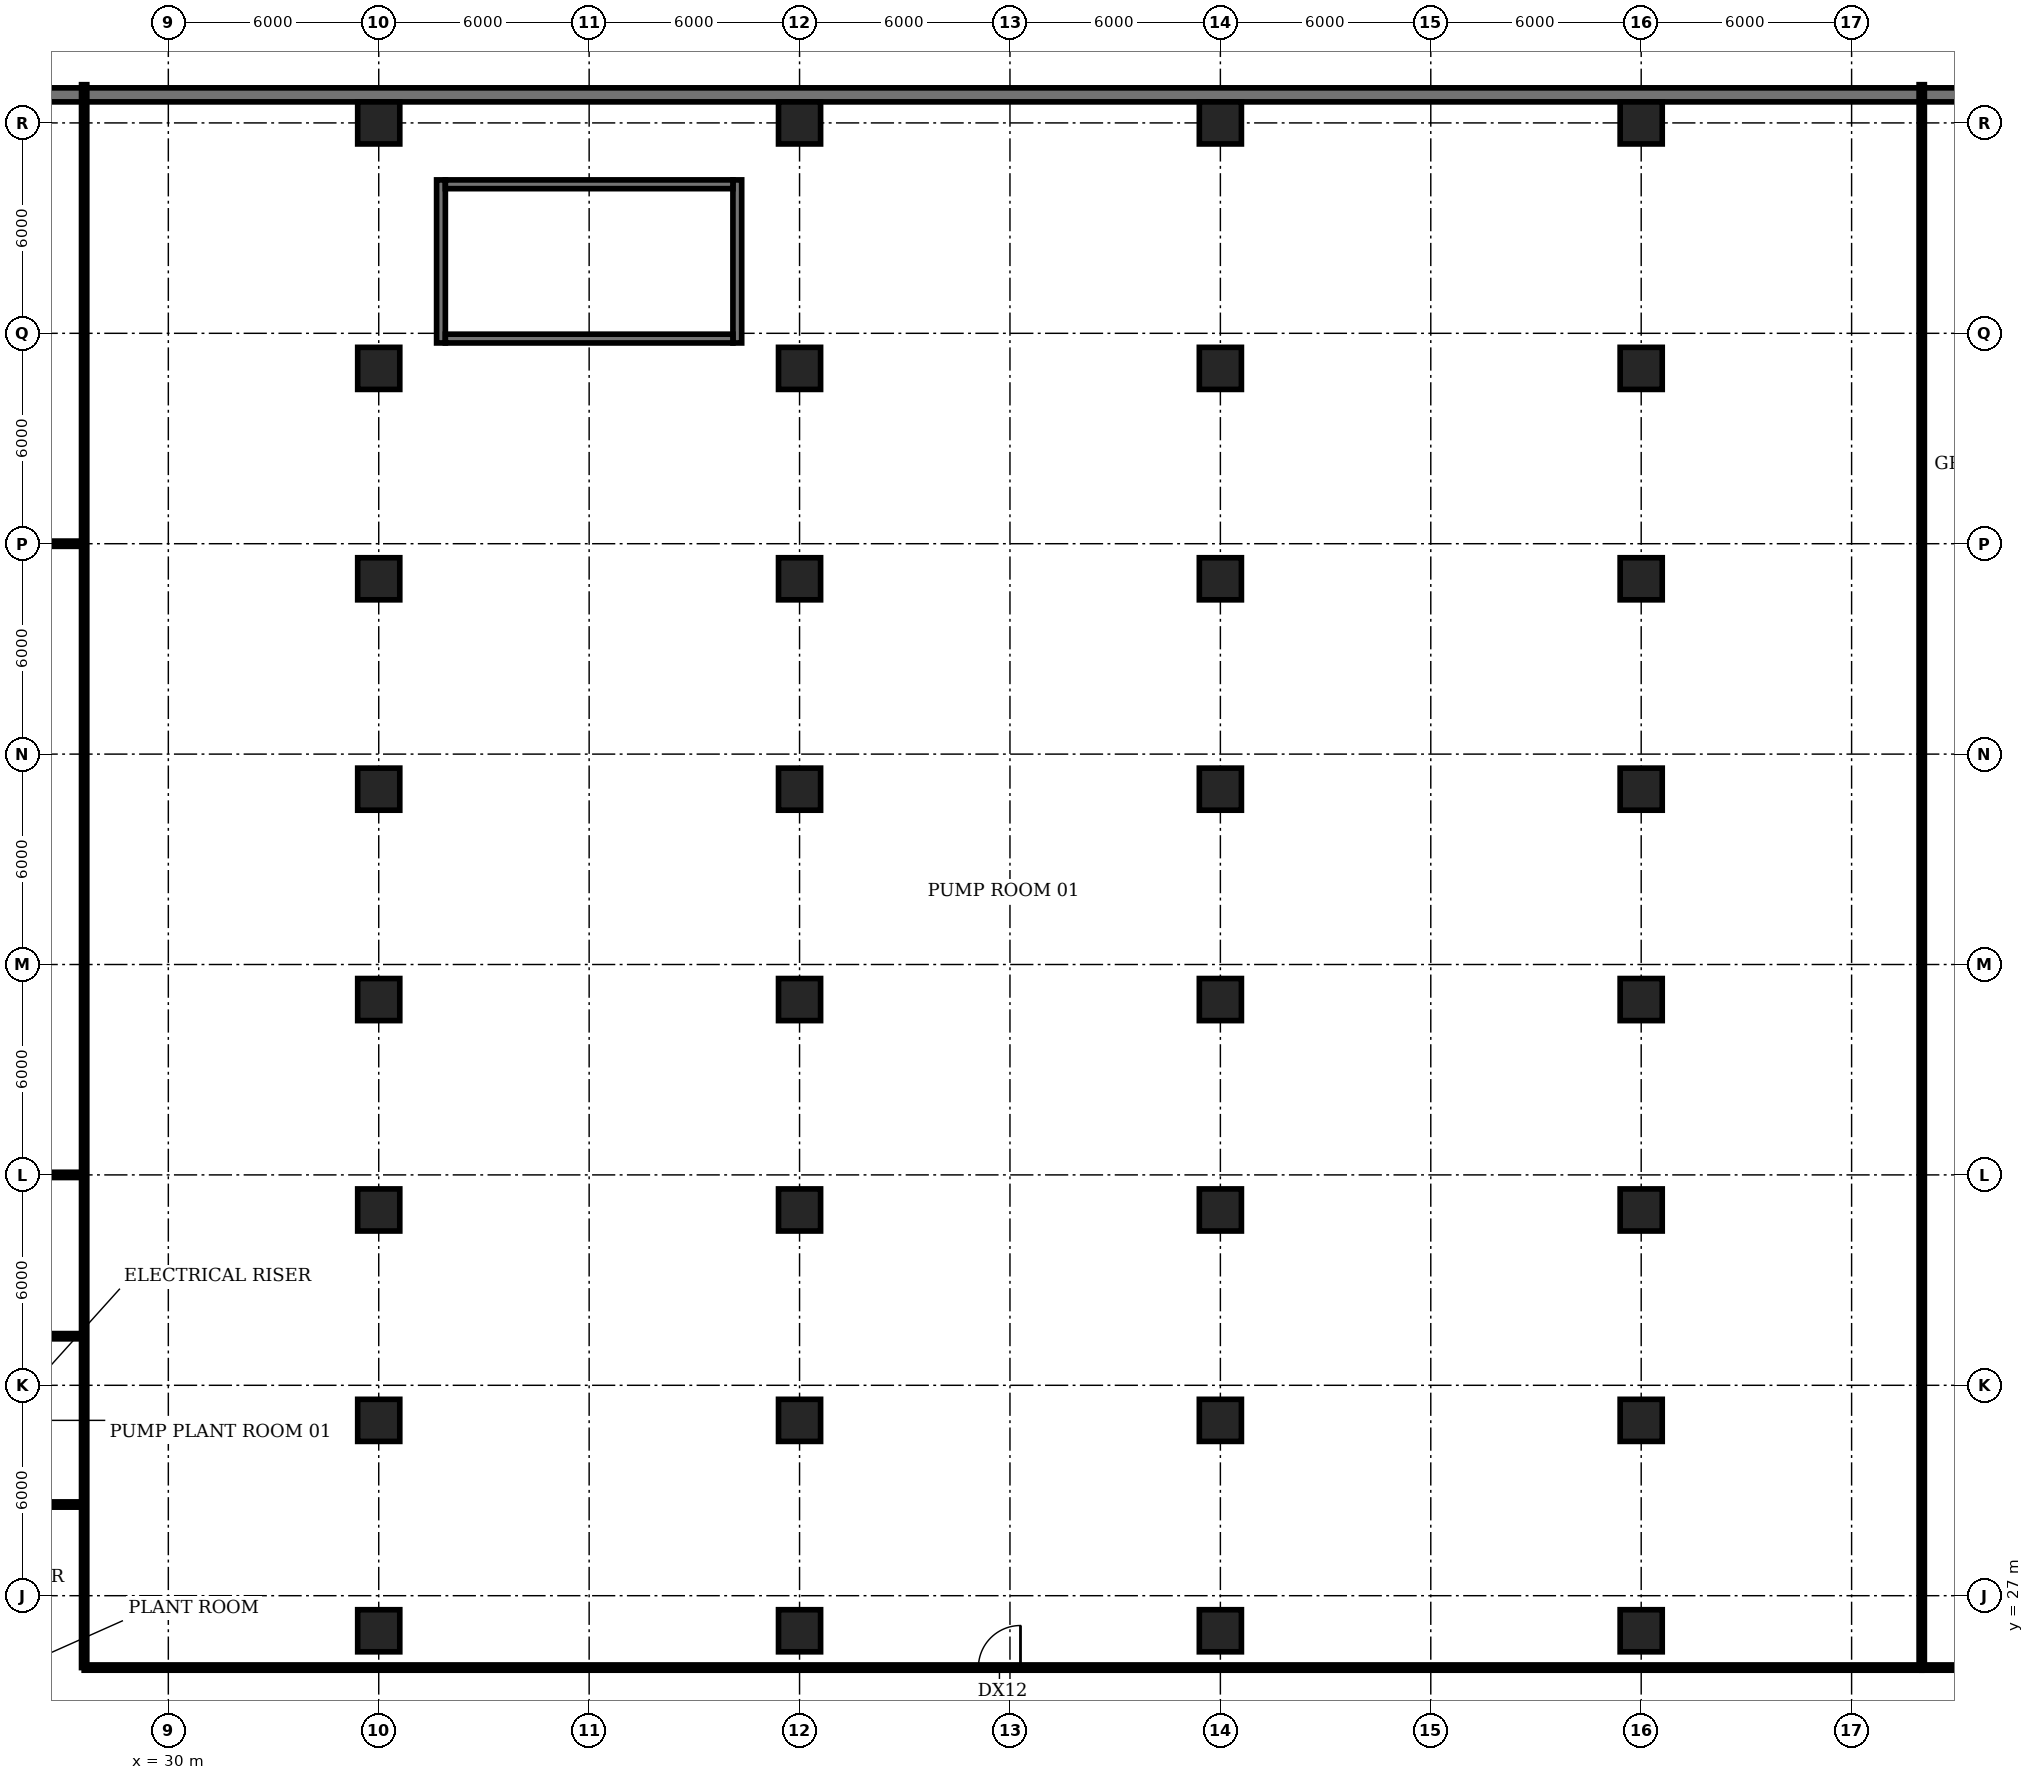
"""IFC4 building model, lengths in metres.
Left out: names, types, materials, properties, quantities, classifications, styles, units other than length and angle.
Written with IfcOpenShell. Run it as: python <this file> out.ifc"""

import sys

from ifc_helpers import new_model, si_unit, direction, frame, frame_2d, origin, origin_2d, place, context, subcontext, project, spatial, rectangle, extrude, element, fill, save


model = new_model("IFC4")
c1 = context("Model", 3, precision=1e-05, world=origin(), true_north=direction((0.0, 1.0)))
c2 = subcontext(c1, "Body", "Model", "MODEL_VIEW")
j1 = project(units=[si_unit("LENGTHUNIT", "METRE"), si_unit("PLANEANGLEUNIT", "RADIAN")], contexts=[c1])
p1 = place(None, origin())
s1 = spatial("IfcSite", under=j1, at=p1, CompositionType="ELEMENT")
p2 = place(p1, origin())
s2 = spatial("IfcBuilding", under=s1, at=p2, CompositionType="ELEMENT")
p3 = place(p2, frame((0.0, 0.0, -6.0)))
s3 = spatial("IfcBuildingStorey", under=s2, at=p3, CompositionType="ELEMENT", Elevation=-6.0)
for number, where, z_axis, x_axis in (
    (1, (36.0, 26.0, -0.3), (0.0, 0.0, 1.0), (1.0, 0.0, 0.0)),
    (2, (36.0, 32.0, -0.3), (0.0, 0.0, 1.0), (1.0, 0.0, 0.0)),
    (3, (36.0, 38.0, -0.3), (0.0, 0.0, 1.0), (1.0, 0.0, 0.0)),
    (4, (36.0, 44.0, -0.3), (0.0, 0.0, 1.0), (1.0, 0.0, 0.0)),
    (5, (36.0, 50.0, -0.3), (0.0, 0.0, 1.0), (1.0, 0.0, 0.0)),
    (6, (36.0, 56.0, -0.3), (0.0, 0.0, 1.0), (1.0, 0.0, 0.0)),
    (7, (36.0, 62.0, -0.3), (0.0, 0.0, 1.0), (1.0, 0.0, 0.0)),
    (8, (36.0, 69.0, -0.3), (0.0, 0.0, 1.0), (1.0, 0.0, 0.0)),
    (9, (48.0, 26.0, -0.3), (0.0, 0.0, 1.0), (1.0, 0.0, 0.0)),
    (10, (48.0, 32.0, -0.3), (0.0, 0.0, 1.0), (1.0, 0.0, 0.0)),
    (11, (48.0, 38.0, -0.3), (0.0, 0.0, 1.0), (1.0, 0.0, 0.0)),
    (12, (48.0, 44.0, -0.3), (0.0, 0.0, 1.0), (1.0, 0.0, 0.0)),
    (13, (48.0, 50.0, -0.3), (0.0, 0.0, 1.0), (1.0, 0.0, 0.0)),
    (14, (48.0, 56.0, -0.3), (0.0, 0.0, 1.0), (1.0, 0.0, 0.0)),
    (15, (48.0, 62.0, -0.3), (0.0, 0.0, 1.0), (1.0, 0.0, 0.0)),
    (16, (48.0, 69.0, -0.3), (0.0, 0.0, 1.0), (1.0, 0.0, 0.0)),
    (17, (60.0, 26.0, -0.3), (0.0, 0.0, 1.0), (1.0, 0.0, 0.0)),
    (18, (60.0, 32.0, -0.3), (0.0, 0.0, 1.0), (1.0, 0.0, 0.0)),
    (19, (60.0, 38.0, -0.3), (0.0, 0.0, 1.0), (1.0, 0.0, 0.0)),
    (20, (60.0, 44.0, -0.3), (0.0, 0.0, 1.0), (1.0, 0.0, 0.0)),
    (21, (60.0, 50.0, -0.3), (0.0, 0.0, 1.0), (1.0, 0.0, 0.0)),
    (22, (60.0, 56.0, -0.3), (0.0, 0.0, 1.0), (1.0, 0.0, 0.0)),
    (23, (60.0, 62.0, -0.3), (0.0, 0.0, 1.0), (1.0, 0.0, 0.0)),
    (24, (60.0, 69.0, -0.3), (0.0, 0.0, 1.0), (1.0, 0.0, 0.0)),
    (25, (72.0, 26.0, -0.3), (0.0, 0.0, 1.0), (1.0, 0.0, 0.0)),
    (26, (72.0, 32.0, -0.3), (0.0, 0.0, 1.0), (1.0, 0.0, 0.0)),
    (27, (72.0, 38.0, -0.3), (0.0, 0.0, 1.0), (1.0, 0.0, 0.0)),
    (28, (72.0, 44.0, -0.3), (0.0, 0.0, 1.0), (1.0, 0.0, 0.0)),
    (29, (72.0, 50.0, -0.3), (0.0, 0.0, 1.0), (1.0, 0.0, 0.0)),
    (30, (72.0, 56.0, -0.3), (0.0, 0.0, 1.0), (1.0, 0.0, 0.0)),
    (31, (72.0, 62.0, -0.3), (0.0, 0.0, 1.0), (1.0, 0.0, 0.0)),
    (32, (72.0, 69.0, -0.3), (0.0, 0.0, 1.0), (1.0, 0.0, 0.0)),
):
    element("IfcColumn", number, at=place(p3, frame(where, z_axis=z_axis, x_axis=x_axis)), inside=s3, PredefinedType="COLUMN", context=c2, shape_type="SweptSolid", body=[
        extrude(rectangle(XDim=1.2, YDim=1.2, at=origin_2d()), origin(), (0.0, 0.0, 1.0), 5.95),
    ])
p4 = place(p3, frame((90.249, 69.8, 0.0), z_axis=(0.0, 0.0, 1.0), x_axis=(-1.0, 0.0, 0.0)))
e33 = element("IfcWall", 33, at=p4, inside=s3, PredefinedType="SOLIDWALL", context=c2, shape_type="SweptSolid", body=[
    extrude(rectangle(XDim=90.497, YDim=0.4, at=frame_2d((45.249, 0.0))), origin(), (0.0, 0.0, 1.0), 5.65),
])
for number, where, z_axis, x_axis in (
    (34, (37.775, 62.725, 0.0), (0.0, 0.0, 1.0), (0.0, 1.0, 0.0)),
    (35, (46.225, 62.725, 0.0), (0.0, 0.0, 1.0), (0.0, 1.0, 0.0)),
):
    element("IfcWall", number, at=place(p3, frame(where, z_axis=z_axis, x_axis=x_axis)), inside=s3, PredefinedType="SHEAR", context=c2, shape_type="SweptSolid", body=[
        extrude(rectangle(XDim=4.65, YDim=0.25, at=frame_2d((2.325, 0.0))), origin(), (0.0, 0.0, 1.0), 5.65),
    ])
for number, where, z_axis, x_axis in (
    (36, (37.9, 62.85, 0.0), (0.0, 0.0, 1.0), (1.0, 0.0, 0.0)),
    (37, (37.9, 67.25, 0.0), (0.0, 0.0, 1.0), (1.0, 0.0, 0.0)),
):
    element("IfcWall", number, at=place(p3, frame(where, z_axis=z_axis, x_axis=x_axis)), inside=s3, PredefinedType="SHEAR", context=c2, shape_type="SweptSolid", body=[
        extrude(rectangle(XDim=8.2, YDim=0.25, at=frame_2d((4.1, 0.0))), origin(), (0.0, 0.0, 1.0), 5.65),
    ])
for number, where, z_axis, x_axis in (
    (38, (10.35, 34.4, 0.0), (0.0, 0.0, 1.0), (1.0, 0.0, 0.0)),
    (39, (10.35, 39.0, 0.0), (0.0, 0.0, 1.0), (1.0, 0.0, 0.0)),
    (40, (10.35, 57.0, 0.0), (0.0, 0.0, 1.0), (1.0, 0.0, 0.0)),
):
    element("IfcWall", number, at=place(p3, frame(where, z_axis=z_axis, x_axis=x_axis)), inside=s3, PredefinedType="PARTITIONING", context=c2, shape_type="SweptSolid", body=[
        extrude(rectangle(XDim=17.25, YDim=0.15, at=frame_2d((8.625, 0.0))), origin(), (0.0, 0.0, 1.0), 4.7),
    ])
p5 = place(p3, frame((24.0, 29.6, 0.0), z_axis=(0.0, 0.0, 1.0), x_axis=(1.0, 0.0, 0.0)))
e41 = element("IfcWall", 41, at=p5, inside=s3, PredefinedType="PARTITIONING", context=c2, shape_type="SweptSolid", body=[
    extrude(rectangle(XDim=3.6, YDim=0.15, at=frame_2d((1.8, 0.0))), origin(), (0.0, 0.0, 1.0), 4.7),
])
p6 = place(p5, frame((1.3, 0.0, 0.0)))
e42 = element("IfcOpeningElement", 42, at=p6, cuts=e41, PredefinedType="OPENING", context=c2, shape_type="SweptSolid", body=[
    extrude(rectangle(XDim=1.2, YDim=2.1, at=frame_2d((0.6, 1.05))), frame((0.0, 0.085, 0.0), z_axis=(0.0, -1.0, 0.0), x_axis=(1.0, 0.0, 0.0)), (0.0, 0.0, 1.0), 0.17),
])
p7 = place(p3, frame((27.6, 24.95, 0.0), z_axis=(0.0, 0.0, 1.0), x_axis=(0.0, 1.0, 0.0)))
e43 = element("IfcWall", 43, at=p7, inside=s3, PredefinedType="PARTITIONING", context=c2, shape_type="SweptSolid", body=[
    extrude(rectangle(XDim=45.14, YDim=0.15, at=frame_2d((22.57, 0.0))), origin(), (0.0, 0.0, 1.0), 4.7),
])
p8 = place(p3, frame((27.6, 24.95, 0.0), z_axis=(0.0, 0.0, 1.0), x_axis=(1.0, 0.0, 0.0)))
e44 = element("IfcWall", 44, at=p8, inside=s3, PredefinedType="PARTITIONING", context=c2, shape_type="SweptSolid", body=[
    extrude(rectangle(XDim=52.4, YDim=0.15, at=frame_2d((26.2, 0.0))), origin(), (0.0, 0.0, 1.0), 4.7),
])
p9 = place(p8, frame((25.5, 0.0, 0.0)))
e45 = element("IfcOpeningElement", 45, at=p9, cuts=e44, PredefinedType="OPENING", context=c2, shape_type="SweptSolid", body=[
    extrude(rectangle(XDim=1.2, YDim=2.1, at=frame_2d((0.6, 1.05))), frame((0.0, 0.085, 0.0), z_axis=(0.0, -1.0, 0.0), x_axis=(1.0, 0.0, 0.0)), (0.0, 0.0, 1.0), 0.17),
])
p10 = place(p3, frame((80.0, 24.95, 0.0), z_axis=(0.0, 0.0, 1.0), x_axis=(0.0, 1.0, 0.0)))
e46 = element("IfcWall", 46, at=p10, inside=s3, PredefinedType="PARTITIONING", context=c2, shape_type="SweptSolid", body=[
    extrude(rectangle(XDim=45.14, YDim=0.15, at=frame_2d((22.57, 0.0))), origin(), (0.0, 0.0, 1.0), 4.7),
])
p11 = place(p3, frame((80.0, 24.95, 0.0), z_axis=(0.0, 0.0, 1.0), x_axis=(1.0, 0.0, 0.0)))
e47 = element("IfcWall", 47, at=p11, inside=s3, PredefinedType="PARTITIONING", context=c2, shape_type="SweptSolid", body=[
    extrude(rectangle(XDim=13.84, YDim=0.15, at=frame_2d((6.92, 0.0))), origin(), (0.0, 0.0, 1.0), 4.7),
])
p12 = place(p9, origin())
e48 = element("IfcDoor", 48, at=p12, inside=s3, OperationType="SINGLE_SWING_RIGHT", PredefinedType="DOOR", context=c2, shape_type="SweptSolid", body=[
    extrude(rectangle(XDim=1.2, YDim=2.1, at=frame_2d((0.6, 1.05))), frame((0.0, 0.025, 0.0), z_axis=(0.0, -1.0, 0.0), x_axis=(1.0, 0.0, 0.0)), (0.0, 0.0, 1.0), 0.05),
])
fill(e45, e48)
save(model, sys.argv[1])
